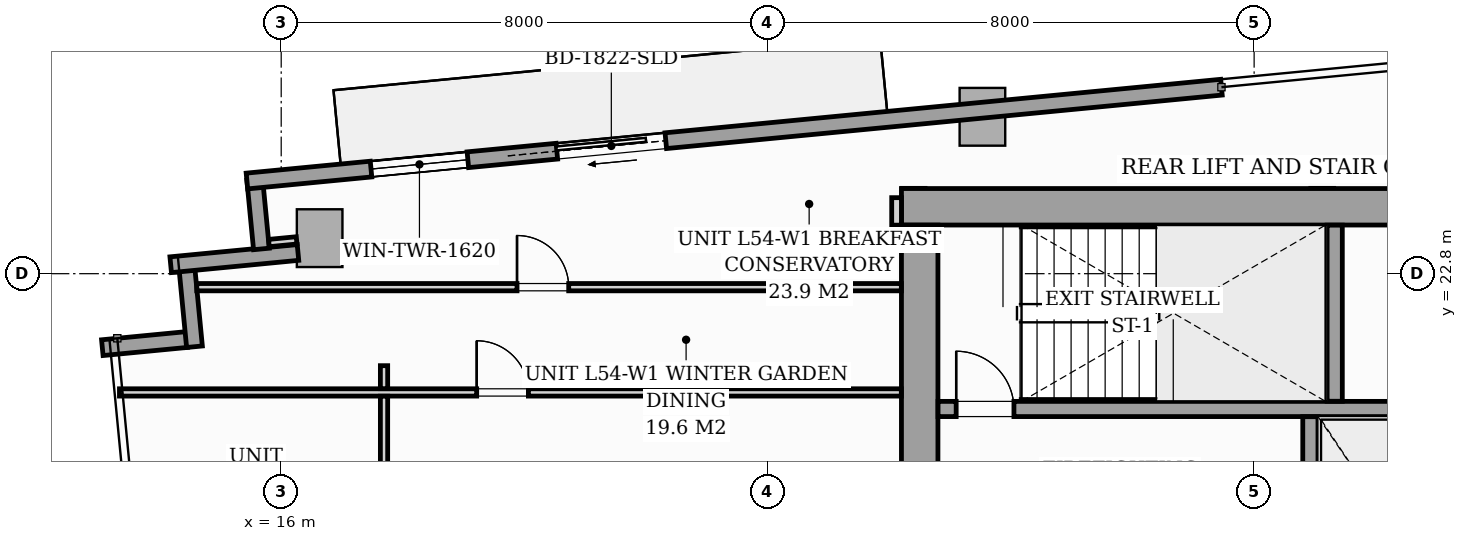
"""IFC4 building model, lengths in metres.
Left out: names, types, materials, properties, quantities, classifications, styles, units other than length and angle.
Written with IfcOpenShell. Run it as: python <this file> out.ifc"""

import sys

from ifc_helpers import new_model, si_unit, direction, frame, frame_2d, origin, origin_2d, place, context, subcontext, project, spatial, rectangle, i_section, extrude, source, transform, mapped, element, fill, save


model = new_model("IFC4")
c1 = context("Model", 3, precision=1e-05, world=origin(), true_north=direction((0.0, 1.0)))
c2 = subcontext(c1, "Body", "Model", "MODEL_VIEW")
j1 = project(units=[si_unit("LENGTHUNIT", "METRE"), si_unit("PLANEANGLEUNIT", "RADIAN")], contexts=[c1])
p1 = place(None, origin())
s1 = spatial("IfcSite", under=j1, at=p1, CompositionType="ELEMENT")
p2 = place(p1, origin())
s2 = spatial("IfcBuilding", under=s1, at=p2, CompositionType="ELEMENT")
p3 = place(p2, frame((0.0, 0.0, 189.0)))
s3 = spatial("IfcBuildingStorey", under=s2, at=p3, CompositionType="ELEMENT", Elevation=189.0)
m1 = source(origin(), c2, "Body", "SweptSolid", [
    extrude(i_section(OverallWidth=0.416, OverallDepth=0.446, WebThickness=0.039, FlangeThickness=0.063, FilletRadius=0.018, at=origin_2d()), origin(), (0.0, 0.0, 1.0), 3.196),
])
for number, where, z_axis, x_axis in (
    (1, (26.4, 24.0, 0.002), (0.0, 0.0, 1.0), (1.0, 0.0, 0.0)),
    (2, (33.12, 24.0, 0.002), (0.0, 0.0, 1.0), (1.0, 0.0, 0.0)),
):
    element("IfcColumn", number, at=place(p3, frame(where, z_axis=z_axis, x_axis=x_axis)), inside=s3, PredefinedType="PILASTER", context=c2, shape_type="MappedRepresentation", body=[
        mapped(m1, transform((0.0, 0.0, 0.0), scale=1.0)),
    ])
m2 = source(origin(), c2, "Body", "SweptSolid", [
    extrude(rectangle(XDim=0.75, YDim=0.95, at=origin_2d()), origin(), (0.0, 0.0, 1.0), 3.196),
])
for number, where, z_axis, x_axis in (
    (3, (16.632, 23.384, 0.002), (0.0, 0.0, 1.0), (0.995, 0.096, 0.0)),
    (4, (27.532, 25.38, 0.002), (0.0, 0.0, 1.0), (0.995, 0.096, 0.0)),
):
    element("IfcColumn", number, at=place(p3, frame(where, z_axis=z_axis, x_axis=x_axis)), inside=s3, PredefinedType="COLUMN", context=c2, shape_type="MappedRepresentation", body=[
        mapped(m2, transform((0.0, 0.0, 0.0), scale=1.0)),
    ])
p4 = place(p3, frame((13.058, 21.583, 0.0), z_axis=(0.0, 0.0, 1.0), x_axis=(0.99540774648, 0.095725744959, 0.0)))
e5 = element("IfcWall", 5, at=p4, inside=s3, PredefinedType="STANDARD", context=c2, shape_type="SweptSolid", body=[
    extrude(rectangle(XDim=1.395, YDim=0.26, at=frame_2d((0.698, 0.0))), origin(), (0.0, 0.0, 1.0), 2.94),
])
p5 = place(p3, frame((14.574, 21.599, 0.0), z_axis=(0.0, 0.0, 1.0), x_axis=(-0.095742423056, 0.99540614245, 0.0)))
e6 = element("IfcWall", 6, at=p5, inside=s3, PredefinedType="STANDARD", context=c2, shape_type="SweptSolid", body=[
    extrude(rectangle(XDim=1.395, YDim=0.26, at=frame_2d((0.697, 0.0))), origin(), (0.0, 0.0, 1.0), 2.94),
])
p6 = place(p3, frame((14.183, 22.947, 0.0), z_axis=(0.0, 0.0, 1.0), x_axis=(0.995401580483, 0.095789840651, 0.0)))
e7 = element("IfcWall", 7, at=p6, inside=s3, PredefinedType="STANDARD", context=c2, shape_type="SweptSolid", body=[
    extrude(rectangle(XDim=2.103, YDim=0.26, at=frame_2d((1.051, 0.0))), origin(), (0.0, 0.0, 1.0), 2.94),
])
p7 = place(p3, frame((15.675, 23.207, 0.0), z_axis=(0.0, 0.0, 1.0), x_axis=(-0.095951054827, 0.995386053287, 0.0)))
e8 = element("IfcWall", 8, at=p7, inside=s3, PredefinedType="STANDARD", context=c2, shape_type="SweptSolid", body=[
    extrude(rectangle(XDim=1.15, YDim=0.26, at=frame_2d((0.575, 0.0))), origin(), (0.0, 0.0, 1.0), 2.94),
])
p8 = place(p3, frame((15.437, 24.324, 0.0), z_axis=(0.0, 0.0, 1.0), x_axis=(0.995395627913, 0.095851676732, 0.0)))
e9 = element("IfcWall", 9, at=p8, inside=s3, PredefinedType="STANDARD", context=c2, shape_type="SweptSolid", body=[
    extrude(rectangle(XDim=16.1, YDim=0.26, at=frame_2d((8.05, 0.0))), origin(), (0.0, 0.0, 1.0), 2.94),
])
p9 = place(p8, frame((5.12, 0.0, 0.0)))
e10 = element("IfcOpeningElement", 10, at=p9, cuts=e9, PredefinedType="OPENING", context=c2, shape_type="SweptSolid", body=[
    extrude(rectangle(XDim=1.8, YDim=2.06, at=frame_2d((0.9, 1.03))), frame((0.0, 0.14, 0.0), z_axis=(0.0, -1.0, 0.0), x_axis=(1.0, 0.0, 0.0)), (0.0, 0.0, 1.0), 0.28),
])
p10 = place(p8, frame((2.05, 0.0, 0.65)))
e11 = element("IfcOpeningElement", 11, at=p10, cuts=e9, PredefinedType="OPENING", context=c2, shape_type="SweptSolid", body=[
    extrude(rectangle(XDim=1.6, YDim=1.5, at=frame_2d((0.8, 0.75))), frame((0.0, 0.14, 0.0), z_axis=(0.0, -1.0, 0.0), x_axis=(1.0, 0.0, 0.0)), (0.0, 0.0, 1.0), 0.28),
])
p11 = place(p3, frame((26.2, 23.9, 0.0), z_axis=(0.0, 0.0, 1.0), x_axis=(1.0, 0.0, 0.0)))
e12 = element("IfcWall", 12, at=p11, inside=s3, PredefinedType="SHEAR", context=c2, shape_type="SweptSolid", body=[
    extrude(rectangle(XDim=19.6, YDim=0.6, at=frame_2d((9.8, 0.0))), origin(), (0.0, 0.0, 1.0), 3.2),
])
p12 = place(p3, frame((26.5, 17.802, 0.0), z_axis=(0.0, 0.0, 1.0), x_axis=(0.0, 1.0, 0.0)))
e13 = element("IfcWall", 13, at=p12, inside=s3, PredefinedType="SHEAR", context=c2, shape_type="SweptSolid", body=[
    extrude(rectangle(XDim=5.796, YDim=0.6, at=frame_2d((2.898, 0.0))), origin(), (0.0, 0.0, 1.0), 3.2),
])
p13 = place(p3, frame((26.802, 20.575, 0.0), z_axis=(0.0, 0.0, 1.0), x_axis=(1.0, 0.0, 0.0)))
e14 = element("IfcWall", 14, at=p13, inside=s3, PredefinedType="SOLIDWALL", context=c2, shape_type="SweptSolid", body=[
    extrude(rectangle(XDim=8.148, YDim=0.25, at=frame_2d((4.074, 0.0))), origin(), (0.0, 0.0, 1.0), 3.2),
])
p14 = place(p13, frame((0.298, 0.0, 0.0)))
e15 = element("IfcOpeningElement", 15, at=p14, cuts=e14, PredefinedType="OPENING", context=c2, shape_type="SweptSolid", body=[
    extrude(rectangle(XDim=0.95, YDim=2.06, at=frame_2d((0.475, 1.03))), frame((0.0, 0.135, 0.0), z_axis=(0.0, -1.0, 0.0), x_axis=(1.0, 0.0, 0.0)), (0.0, 0.0, 1.0), 0.27),
])
p15 = place(p3, frame((33.325, 20.702, 0.0), z_axis=(0.0, 0.0, 1.0), x_axis=(0.0, 1.0, 0.0)))
e16 = element("IfcWall", 16, at=p15, inside=s3, PredefinedType="SOLIDWALL", context=c2, shape_type="SweptSolid", body=[
    extrude(rectangle(XDim=2.896, YDim=0.25, at=frame_2d((1.448, 0.0))), origin(), (0.0, 0.0, 1.0), 3.2),
])
p16 = place(p3, frame((32.925, 17.802, 0.0), z_axis=(0.0, 0.0, 1.0), x_axis=(0.0, 1.0, 0.0)))
e17 = element("IfcWall", 17, at=p16, inside=s3, PredefinedType="SOLIDWALL", context=c2, shape_type="SweptSolid", body=[
    extrude(rectangle(XDim=2.646, YDim=0.25, at=frame_2d((1.323, 0.0))), origin(), (0.0, 0.0, 1.0), 3.2),
])
p17 = place(p16, frame((0.548, 0.0, 0.0)))
e18 = element("IfcOpeningElement", 18, at=p17, cuts=e17, PredefinedType="OPENING", context=c2, shape_type="SweptSolid", body=[
    extrude(rectangle(XDim=1.1, YDim=2.08, at=frame_2d((0.55, 1.04))), frame((0.0, 0.135, 0.0), z_axis=(0.0, -1.0, 0.0), x_axis=(1.0, 0.0, 0.0)), (0.0, 0.0, 1.0), 0.27),
])
p18 = place(p3, frame((26.12, 23.598, 0.0), z_axis=(0.0, 0.0, 1.0), x_axis=(0.0, 1.0, 0.0)))
e19 = element("IfcWall", 19, at=p18, inside=s3, PredefinedType="PARTITIONING", context=c2, shape_type="SweptSolid", body=[
    extrude(rectangle(XDim=0.452, YDim=0.16, at=frame_2d((0.226, 0.0))), origin(), (0.0, 0.0, 1.0), 2.94),
])
p19 = place(p3, frame((14.612, 22.578, 0.0), z_axis=(0.0, 0.0, 1.0), x_axis=(1.0, 0.0, 0.0)))
e20 = element("IfcWall", 20, at=p19, inside=s3, PredefinedType="PARTITIONING", context=c2, shape_type="SweptSolid", body=[
    extrude(rectangle(XDim=11.586, YDim=0.12, at=frame_2d((5.793, 0.0))), origin(), (0.0, 0.0, 1.0), 2.94),
])
p20 = place(p19, frame((5.266, 0.0, 0.0)))
e21 = element("IfcOpeningElement", 21, at=p20, cuts=e20, PredefinedType="OPENING", context=c2, shape_type="SweptSolid", body=[
    extrude(rectangle(XDim=0.85, YDim=2.05, at=frame_2d((0.425, 1.025))), frame((0.0, 0.07, 0.0), z_axis=(0.0, -1.0, 0.0), x_axis=(1.0, 0.0, 0.0)), (0.0, 0.0, 1.0), 0.14),
])
p21 = place(p3, frame((13.34, 20.847, 0.0), z_axis=(0.0, 0.0, 1.0), x_axis=(1.0, 0.0, 0.0)))
e22 = element("IfcWall", 22, at=p21, inside=s3, PredefinedType="PARTITIONING", context=c2, shape_type="SweptSolid", body=[
    extrude(rectangle(XDim=12.858, YDim=0.12, at=frame_2d((6.429, 0.0))), origin(), (0.0, 0.0, 1.0), 2.94),
])
p22 = place(p21, frame((5.875, 0.0, 0.0)))
e23 = element("IfcOpeningElement", 23, at=p22, cuts=e22, PredefinedType="OPENING", context=c2, shape_type="SweptSolid", body=[
    extrude(rectangle(XDim=0.85, YDim=2.05, at=frame_2d((0.425, 1.025))), frame((0.0, 0.07, 0.0), z_axis=(0.0, -1.0, 0.0), x_axis=(1.0, 0.0, 0.0)), (0.0, 0.0, 1.0), 0.14),
])
p23 = place(p3, frame((17.691, 12.096, 0.0), z_axis=(0.0, 0.0, 1.0), x_axis=(0.0, 1.0, 0.0)))
e24 = element("IfcWall", 24, at=p23, inside=s3, PredefinedType="PARTITIONING", context=c2, shape_type="SweptSolid", body=[
    extrude(rectangle(XDim=8.689, YDim=0.12, at=frame_2d((4.344, 0.0))), origin(), (0.0, 0.0, 1.0), 2.94),
])
p24 = place(p23, frame((3.92, 0.0, 0.0)))
e25 = element("IfcOpeningElement", 25, at=p24, cuts=e24, PredefinedType="OPENING", context=c2, shape_type="SweptSolid", body=[
    extrude(rectangle(XDim=0.85, YDim=2.05, at=frame_2d((0.425, 1.025))), frame((0.0, 0.07, 0.0), z_axis=(0.0, -1.0, 0.0), x_axis=(1.0, 0.0, 0.0)), (0.0, 0.0, 1.0), 0.14),
])
p25 = place(p3, frame((17.691, 20.909, 0.0), z_axis=(0.0, 0.0, 1.0), x_axis=(0.0, 1.0, 0.0)))
e26 = element("IfcWall", 26, at=p25, inside=s3, PredefinedType="PARTITIONING", context=c2, shape_type="SweptSolid", body=[
    extrude(rectangle(XDim=0.378, YDim=0.12, at=frame_2d((0.189, 0.0))), origin(), (0.0, 0.0, 1.0), 2.94),
])
p26 = place(p3, frame((16.254, 23.348, 0.0), z_axis=(0.0, 0.0, 1.0), x_axis=(-0.995389482415, -0.095915474751, 0.0)))
e27 = element("IfcWall", 27, at=p26, inside=s3, PredefinedType="PARTITIONING", context=c2, shape_type="SweptSolid", body=[
    extrude(rectangle(XDim=0.458, YDim=0.12, at=frame_2d((0.229, 0.0))), origin(), (0.0, 0.0, 1.0), 2.94),
])
m3 = source(origin(), c2, "Body", "SweptSolid", [
    extrude(rectangle(XDim=1.8, YDim=2.06, at=frame_2d((0.9, 1.03))), frame((0.0, 0.025, 0.0), z_axis=(0.0, -1.0, 0.0), x_axis=(1.0, 0.0, 0.0)), (0.0, 0.0, 1.0), 0.05),
])
p27 = place(p9, origin())
e28 = element("IfcDoor", 28, at=p27, inside=s3, OperationType="SLIDING_TO_LEFT", PredefinedType="DOOR", context=c2, shape_type="MappedRepresentation", body=[
    mapped(m3, transform((0.0, 0.0, 0.0), scale=1.0)),
])
fill(e10, e28)
m4 = source(origin(), c2, "Body", "SweptSolid", [
    extrude(rectangle(XDim=1.6, YDim=1.5, at=frame_2d((0.8, 0.75))), frame((0.0, 0.03, 0.0), z_axis=(0.0, -1.0, 0.0), x_axis=(1.0, 0.0, 0.0)), (0.0, 0.0, 1.0), 0.06),
])
p28 = place(p10, origin())
e29 = element("IfcWindow", 29, at=p28, inside=s3, PartitioningType="SINGLE_PANEL", PredefinedType="WINDOW", context=c2, shape_type="MappedRepresentation", body=[
    mapped(m4, transform((0.0, 0.0, 0.0), scale=1.0)),
])
fill(e11, e29)
m5 = source(origin(), c2, "Body", "SweptSolid", [
    extrude(rectangle(XDim=0.95, YDim=2.06, at=frame_2d((0.475, 1.03))), frame((0.0, 0.025, 0.0), z_axis=(0.0, -1.0, 0.0), x_axis=(1.0, 0.0, 0.0)), (0.0, 0.0, 1.0), 0.05),
])
p29 = place(p14, origin())
e30 = element("IfcDoor", 30, at=p29, inside=s3, OperationType="SINGLE_SWING_LEFT", PredefinedType="DOOR", context=c2, shape_type="MappedRepresentation", body=[
    mapped(m5, transform((0.0, 0.0, 0.0), scale=1.0)),
])
fill(e15, e30)
m6 = source(origin(), c2, "Body", "SweptSolid", [
    extrude(rectangle(XDim=0.85, YDim=2.05, at=frame_2d((0.425, 1.025))), frame((0.0, 0.025, 0.0), z_axis=(0.0, -1.0, 0.0), x_axis=(1.0, 0.0, 0.0)), (0.0, 0.0, 1.0), 0.05),
])
p30 = place(p20, origin())
e31 = element("IfcDoor", 31, at=p30, inside=s3, OperationType="SINGLE_SWING_LEFT", PredefinedType="DOOR", context=c2, shape_type="MappedRepresentation", body=[
    mapped(m6, transform((0.0, 0.0, 0.0), scale=1.0)),
])
fill(e21, e31)
p31 = place(p22, origin())
e32 = element("IfcDoor", 32, at=p31, inside=s3, OperationType="SINGLE_SWING_LEFT", PredefinedType="DOOR", context=c2, shape_type="MappedRepresentation", body=[
    mapped(m6, transform((0.0, 0.0, 0.0), scale=1.0)),
])
fill(e23, e32)
save(model, sys.argv[1])
